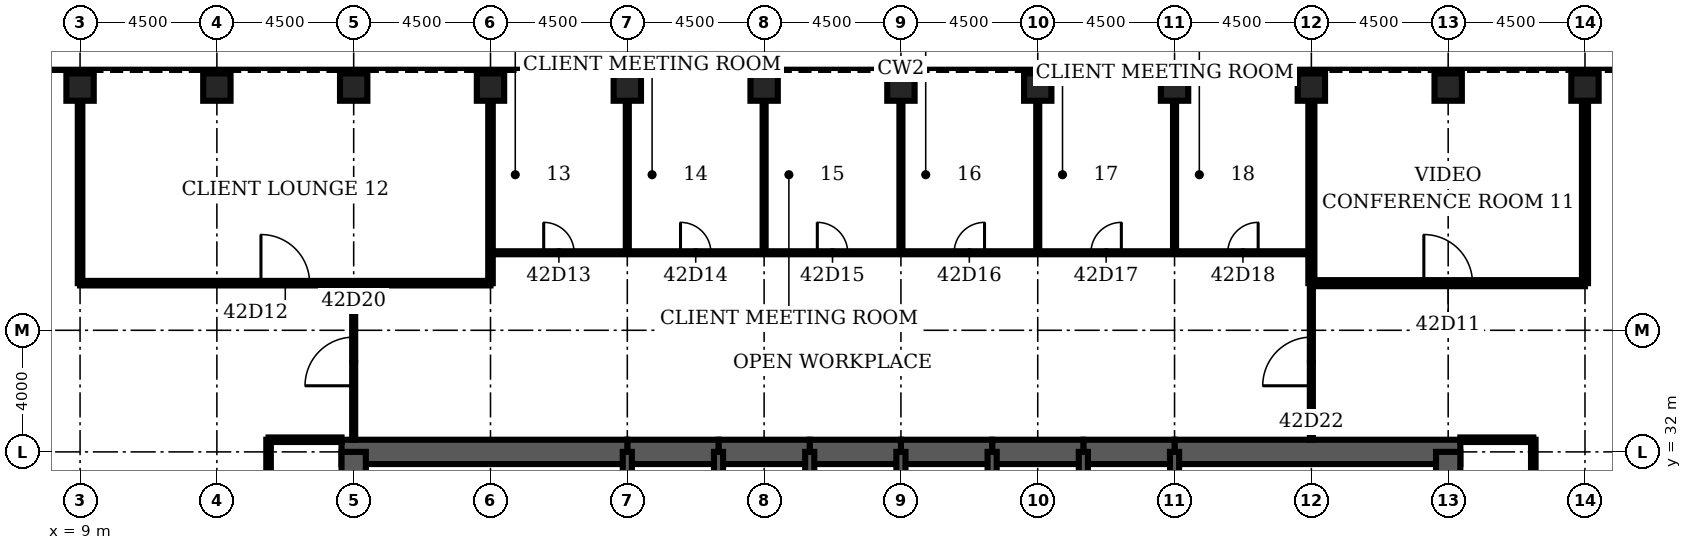
"""IFC4 building model, lengths in metres.
Left out: names, types, materials, properties, quantities, classifications, styles, units other than length and angle.
Written with IfcOpenShell. Run it as: python <this file> out.ifc"""

import sys

from ifc_helpers import new_model, si_unit, direction, frame, frame_2d, origin, origin_2d, place, context, subcontext, project, spatial, rectangle, hollow_rectangle, extrude, element, fill, save


model = new_model("IFC4")
c1 = context("Model", 3, precision=1e-05, world=origin(), true_north=direction((0.0, 1.0)))
c2 = subcontext(c1, "Body", "Model", "MODEL_VIEW")
j1 = project(units=[si_unit("LENGTHUNIT", "METRE"), si_unit("PLANEANGLEUNIT", "RADIAN")], contexts=[c1])
p1 = place(None, origin())
s1 = spatial("IfcSite", under=j1, at=p1, CompositionType="ELEMENT")
p2 = place(p1, origin())
s2 = spatial("IfcBuilding", under=s1, at=p2, CompositionType="ELEMENT")
p3 = place(p2, frame((0.0, 0.0, 190.0)))
s3 = spatial("IfcBuildingStorey", under=s2, at=p3, CompositionType="ELEMENT", Elevation=190.0)
for number, where, z_axis, x_axis in (
    (1, (58.5, 44.0, 0.0), (0.0, 0.0, 1.0), (0.0, 1.0, 0.0)),
    (2, (54.0, 44.0, 0.0), (0.0, 0.0, 1.0), (0.0, 1.0, 0.0)),
    (3, (49.5, 44.0, 0.0), (0.0, 0.0, 1.0), (0.0, 1.0, 0.0)),
    (4, (45.0, 44.0, 0.0), (0.0, 0.0, 1.0), (0.0, 1.0, 0.0)),
    (5, (40.5, 44.0, 0.0), (0.0, 0.0, 1.0), (0.0, 1.0, 0.0)),
    (6, (36.0, 44.0, 0.0), (0.0, 0.0, 1.0), (0.0, 1.0, 0.0)),
    (7, (31.5, 44.0, 0.0), (0.0, 0.0, 1.0), (0.0, 1.0, 0.0)),
    (8, (27.0, 44.0, 0.0), (0.0, 0.0, 1.0), (0.0, 1.0, 0.0)),
    (9, (22.5, 44.0, 0.0), (0.0, 0.0, 1.0), (0.0, 1.0, 0.0)),
    (10, (18.0, 44.0, 0.0), (0.0, 0.0, 1.0), (0.0, 1.0, 0.0)),
    (11, (13.5, 44.0, 0.0), (0.0, 0.0, 1.0), (0.0, 1.0, 0.0)),
    (12, (9.0, 44.0, 0.0), (0.0, 0.0, 1.0), (0.0, 1.0, 0.0)),
):
    element("IfcColumn", number, at=place(p3, frame(where, z_axis=z_axis, x_axis=x_axis)), inside=s3, PredefinedType="COLUMN", context=c2, shape_type="SweptSolid", body=[
        extrude(hollow_rectangle(XDim=0.9, YDim=0.9, WallThickness=0.09, at=origin_2d()), origin(), (0.0, 0.0, 1.0), 4.2),
    ])
p4 = place(p3, frame((54.4, 32.0, 0.0), z_axis=(0.0, 0.0, 1.0), x_axis=(-1.0, 0.0, 0.0)))
e13 = element("IfcWall", 13, at=p4, inside=s3, PredefinedType="SHEAR", context=c2, shape_type="SweptSolid", body=[
    extrude(rectangle(XDim=9.4, YDim=0.8, at=frame_2d((4.7, 0.0))), origin(), (0.0, 0.0, 1.0), 4.2),
])
for number, where, z_axis, x_axis in (
    (14, (45.0, 32.0, 0.0), (0.0, 0.0, 1.0), (-1.0, 0.0, 0.0)),
    (15, (42.0, 32.0, 0.0), (0.0, 0.0, 1.0), (-1.0, 0.0, 0.0)),
    (16, (39.0, 32.0, 0.0), (0.0, 0.0, 1.0), (-1.0, 0.0, 0.0)),
    (17, (36.0, 32.0, 0.0), (0.0, 0.0, 1.0), (-1.0, 0.0, 0.0)),
    (18, (33.0, 32.0, 0.0), (0.0, 0.0, 1.0), (-1.0, 0.0, 0.0)),
    (19, (30.0, 32.0, 0.0), (0.0, 0.0, 1.0), (-1.0, 0.0, 0.0)),
):
    element("IfcWall", number, at=place(p3, frame(where, z_axis=z_axis, x_axis=x_axis)), inside=s3, PredefinedType="SHEAR", context=c2, shape_type="SweptSolid", body=[
        extrude(rectangle(XDim=3.0, YDim=0.8, at=frame_2d((1.5, 0.0))), origin(), (0.0, 0.0, 1.0), 4.2),
    ])
p5 = place(p3, frame((27.0, 32.0, 0.0), z_axis=(0.0, 0.0, 1.0), x_axis=(-1.0, 0.0, 0.0)))
e20 = element("IfcWall", 20, at=p5, inside=s3, PredefinedType="SHEAR", context=c2, shape_type="SweptSolid", body=[
    extrude(rectangle(XDim=9.4, YDim=0.8, at=frame_2d((4.7, 0.0))), origin(), (0.0, 0.0, 1.0), 4.2),
])
for number, where, z_axis, x_axis in (
    (21, (18.0, 32.0, 0.0), (0.0, 0.0, 1.0), (0.0, -1.0, 0.0)),
    (22, (54.0, 28.8, 0.0), (0.0, 0.0, 1.0), (0.0, 1.0, 0.0)),
):
    element("IfcWall", number, at=place(p3, frame(where, z_axis=z_axis, x_axis=x_axis)), inside=s3, PredefinedType="SHEAR", context=c2, shape_type="SweptSolid", body=[
        extrude(rectangle(XDim=3.2, YDim=0.8, at=frame_2d((1.6, 0.0))), origin(), (0.0, 0.0, 1.0), 4.2),
    ])
for number, where, z_axis, x_axis in (
    (23, (27.0, 28.8, 0.0), (0.0, 0.0, 1.0), (0.0, 1.0, 0.0)),
    (24, (30.0, 28.8, 0.0), (0.0, 0.0, 1.0), (0.0, 1.0, 0.0)),
    (25, (33.0, 28.8, 0.0), (0.0, 0.0, 1.0), (0.0, 1.0, 0.0)),
    (26, (36.0, 28.8, 0.0), (0.0, 0.0, 1.0), (0.0, 1.0, 0.0)),
    (27, (39.0, 28.8, 0.0), (0.0, 0.0, 1.0), (0.0, 1.0, 0.0)),
    (28, (42.0, 28.8, 0.0), (0.0, 0.0, 1.0), (0.0, 1.0, 0.0)),
    (29, (45.0, 28.8, 0.0), (0.0, 0.0, 1.0), (0.0, 1.0, 0.0)),
):
    element("IfcWall", number, at=place(p3, frame(where, z_axis=z_axis, x_axis=x_axis)), inside=s3, PredefinedType="SOLIDWALL", context=c2, shape_type="SweptSolid", body=[
        extrude(rectangle(XDim=3.2, YDim=0.3, at=frame_2d((1.6, 0.0))), origin(), (0.0, 0.0, 1.0), 4.2),
    ])
for number, where, z_axis, x_axis in (
    (30, (15.2, 32.4, 0.0), (0.0, 0.0, 1.0), (1.0, 0.0, 0.0)),
    (31, (54.4, 32.4, 0.0), (0.0, 0.0, 1.0), (1.0, 0.0, 0.0)),
):
    element("IfcWall", number, at=place(p3, frame(where, z_axis=z_axis, x_axis=x_axis)), inside=s3, PredefinedType="PARTITIONING", context=c2, shape_type="SweptSolid", body=[
        extrude(rectangle(XDim=2.4, YDim=0.15, at=frame_2d((1.2, 0.0))), origin(), (0.0, 0.0, 1.0), 3.0),
    ])
p6 = place(p3, frame((9.0, 37.55, 0.0), z_axis=(0.0, 0.0, 1.0), x_axis=(1.0, 0.0, 0.0)))
e32 = element("IfcWall", 32, at=p6, inside=s3, PredefinedType="PARTITIONING", context=c2, shape_type="SweptSolid", body=[
    extrude(rectangle(XDim=13.5, YDim=0.15, at=frame_2d((6.75, 0.0))), origin(), (0.0, 0.0, 1.0), 3.0),
])
p7 = place(p6, frame((5.95, 0.0, 0.0)))
e33 = element("IfcOpeningElement", 33, at=p7, cuts=e32, PredefinedType="OPENING", context=c2, shape_type="SweptSolid", body=[
    extrude(rectangle(XDim=1.6, YDim=2.1, at=frame_2d((0.8, 1.05))), frame((0.0, 0.085, 0.0), z_axis=(0.0, -1.0, 0.0), x_axis=(1.0, 0.0, 0.0)), (0.0, 0.0, 1.0), 0.17),
])
p8 = place(p3, frame((49.5, 37.55, 0.0), z_axis=(0.0, 0.0, 1.0), x_axis=(1.0, 0.0, 0.0)))
e34 = element("IfcWall", 34, at=p8, inside=s3, PredefinedType="PARTITIONING", context=c2, shape_type="SweptSolid", body=[
    extrude(rectangle(XDim=9.0, YDim=0.2, at=frame_2d((4.5, 0.0))), origin(), (0.0, 0.0, 1.0), 3.0),
])
p9 = place(p8, frame((3.7, 0.0, 0.0)))
e35 = element("IfcOpeningElement", 35, at=p9, cuts=e34, PredefinedType="OPENING", context=c2, shape_type="SweptSolid", body=[
    extrude(rectangle(XDim=1.6, YDim=2.1, at=frame_2d((0.8, 1.05))), frame((0.0, 0.11, 0.0), z_axis=(0.0, -1.0, 0.0), x_axis=(1.0, 0.0, 0.0)), (0.0, 0.0, 1.0), 0.22),
])
p10 = place(p3, frame((22.5, 38.55, 0.0), z_axis=(0.0, 0.0, 1.0), x_axis=(1.0, 0.0, 0.0)))
e36 = element("IfcWall", 36, at=p10, inside=s3, PredefinedType="PARTITIONING", context=c2, shape_type="SweptSolid", body=[
    extrude(rectangle(XDim=27.0, YDim=0.1, at=frame_2d((13.5, 0.0))), origin(), (0.0, 0.0, 1.0), 3.0),
])
p11 = place(p10, frame((1.75, 0.0, 0.0)))
e37 = element("IfcOpeningElement", 37, at=p11, cuts=e36, PredefinedType="OPENING", context=c2, shape_type="SweptSolid", body=[
    extrude(rectangle(XDim=1.0, YDim=2.1, at=frame_2d((0.5, 1.05))), frame((0.0, 0.06, 0.0), z_axis=(0.0, -1.0, 0.0), x_axis=(1.0, 0.0, 0.0)), (0.0, 0.0, 1.0), 0.12),
])
p12 = place(p10, frame((6.25, 0.0, 0.0)))
e38 = element("IfcOpeningElement", 38, at=p12, cuts=e36, PredefinedType="OPENING", context=c2, shape_type="SweptSolid", body=[
    extrude(rectangle(XDim=1.0, YDim=2.1, at=frame_2d((0.5, 1.05))), frame((0.0, 0.06, 0.0), z_axis=(0.0, -1.0, 0.0), x_axis=(1.0, 0.0, 0.0)), (0.0, 0.0, 1.0), 0.12),
])
p13 = place(p10, frame((10.75, 0.0, 0.0)))
e39 = element("IfcOpeningElement", 39, at=p13, cuts=e36, PredefinedType="OPENING", context=c2, shape_type="SweptSolid", body=[
    extrude(rectangle(XDim=1.0, YDim=2.1, at=frame_2d((0.5, 1.05))), frame((0.0, 0.06, 0.0), z_axis=(0.0, -1.0, 0.0), x_axis=(1.0, 0.0, 0.0)), (0.0, 0.0, 1.0), 0.12),
])
p14 = place(p10, frame((15.25, 0.0, 0.0)))
e40 = element("IfcOpeningElement", 40, at=p14, cuts=e36, PredefinedType="OPENING", context=c2, shape_type="SweptSolid", body=[
    extrude(rectangle(XDim=1.0, YDim=2.1, at=frame_2d((0.5, 1.05))), frame((0.0, 0.06, 0.0), z_axis=(0.0, -1.0, 0.0), x_axis=(1.0, 0.0, 0.0)), (0.0, 0.0, 1.0), 0.12),
])
p15 = place(p10, frame((19.75, 0.0, 0.0)))
e41 = element("IfcOpeningElement", 41, at=p15, cuts=e36, PredefinedType="OPENING", context=c2, shape_type="SweptSolid", body=[
    extrude(rectangle(XDim=1.0, YDim=2.1, at=frame_2d((0.5, 1.05))), frame((0.0, 0.06, 0.0), z_axis=(0.0, -1.0, 0.0), x_axis=(1.0, 0.0, 0.0)), (0.0, 0.0, 1.0), 0.12),
])
p16 = place(p10, frame((24.25, 0.0, 0.0)))
e42 = element("IfcOpeningElement", 42, at=p16, cuts=e36, PredefinedType="OPENING", context=c2, shape_type="SweptSolid", body=[
    extrude(rectangle(XDim=1.0, YDim=2.1, at=frame_2d((0.5, 1.05))), frame((0.0, 0.06, 0.0), z_axis=(0.0, -1.0, 0.0), x_axis=(1.0, 0.0, 0.0)), (0.0, 0.0, 1.0), 0.12),
])
p17 = place(p3, frame((9.0, 37.55, 0.0), z_axis=(0.0, 0.0, 1.0), x_axis=(0.0, 1.0, 0.0)))
e43 = element("IfcWall", 43, at=p17, inside=s3, PredefinedType="PARTITIONING", context=c2, shape_type="SweptSolid", body=[
    extrude(rectangle(XDim=6.0, YDim=0.15, at=frame_2d((3.0, 0.0))), origin(), (0.0, 0.0, 1.0), 3.0),
])
p18 = place(p3, frame((15.2, 13.8, 0.0), z_axis=(0.0, 0.0, 1.0), x_axis=(0.0, 1.0, 0.0)))
e44 = element("IfcWall", 44, at=p18, inside=s3, PredefinedType="PARTITIONING", context=c2, shape_type="SweptSolid", body=[
    extrude(rectangle(XDim=18.6, YDim=0.15, at=frame_2d((9.3, 0.0))), origin(), (0.0, 0.0, 1.0), 3.0),
])
p19 = place(p18, frame((8.7, 0.0, 0.0)))
e45 = element("IfcOpeningElement", 45, at=p19, cuts=e44, PredefinedType="OPENING", context=c2, shape_type="SweptSolid", body=[
    extrude(rectangle(XDim=1.2, YDim=2.1, at=frame_2d((0.6, 1.05))), frame((0.0, 0.085, 0.0), z_axis=(0.0, -1.0, 0.0), x_axis=(1.0, 0.0, 0.0)), (0.0, 0.0, 1.0), 0.17),
])
p20 = place(p3, frame((18.0, 32.4, 0.0), z_axis=(0.0, 0.0, 1.0), x_axis=(0.0, 1.0, 0.0)))
e46 = element("IfcWall", 46, at=p20, inside=s3, PredefinedType="PARTITIONING", context=c2, shape_type="SweptSolid", body=[
    extrude(rectangle(XDim=5.15, YDim=0.1, at=frame_2d((2.575, 0.0))), origin(), (0.0, 0.0, 1.0), 3.0),
])
p21 = place(p20, frame((1.775, 0.0, 0.0)))
e47 = element("IfcOpeningElement", 47, at=p21, cuts=e46, PredefinedType="OPENING", context=c2, shape_type="SweptSolid", body=[
    extrude(rectangle(XDim=1.6, YDim=2.1, at=frame_2d((0.8, 1.05))), frame((0.0, 0.06, 0.0), z_axis=(0.0, -1.0, 0.0), x_axis=(1.0, 0.0, 0.0)), (0.0, 0.0, 1.0), 0.12),
])
p22 = place(p3, frame((22.5, 37.55, 0.0), z_axis=(0.0, 0.0, 1.0), x_axis=(0.0, 1.0, 0.0)))
e48 = element("IfcWall", 48, at=p22, inside=s3, PredefinedType="PARTITIONING", context=c2, shape_type="SweptSolid", body=[
    extrude(rectangle(XDim=6.0, YDim=0.15, at=frame_2d((3.0, 0.0))), origin(), (0.0, 0.0, 1.0), 3.0),
])
for number, where, z_axis, x_axis in (
    (49, (27.0, 38.55, 0.0), (0.0, 0.0, 1.0), (0.0, 1.0, 0.0)),
    (50, (31.5, 38.55, 0.0), (0.0, 0.0, 1.0), (0.0, 1.0, 0.0)),
    (51, (36.0, 38.55, 0.0), (0.0, 0.0, 1.0), (0.0, 1.0, 0.0)),
    (52, (40.5, 38.55, 0.0), (0.0, 0.0, 1.0), (0.0, 1.0, 0.0)),
    (53, (45.0, 38.55, 0.0), (0.0, 0.0, 1.0), (0.0, 1.0, 0.0)),
):
    element("IfcWall", number, at=place(p3, frame(where, z_axis=z_axis, x_axis=x_axis)), inside=s3, PredefinedType="PARTITIONING", context=c2, shape_type="SweptSolid", body=[
        extrude(rectangle(XDim=5.0, YDim=0.1, at=frame_2d((2.5, 0.0))), origin(), (0.0, 0.0, 1.0), 3.0),
    ])
p23 = place(p3, frame((49.5, 32.4, 0.0), z_axis=(0.0, 0.0, 1.0), x_axis=(0.0, 1.0, 0.0)))
e54 = element("IfcWall", 54, at=p23, inside=s3, PredefinedType="PARTITIONING", context=c2, shape_type="SweptSolid", body=[
    extrude(rectangle(XDim=5.15, YDim=0.1, at=frame_2d((2.575, 0.0))), origin(), (0.0, 0.0, 1.0), 3.0),
])
p24 = place(p23, frame((1.775, 0.0, 0.0)))
e55 = element("IfcOpeningElement", 55, at=p24, cuts=e54, PredefinedType="OPENING", context=c2, shape_type="SweptSolid", body=[
    extrude(rectangle(XDim=1.6, YDim=2.1, at=frame_2d((0.8, 1.05))), frame((0.0, 0.06, 0.0), z_axis=(0.0, -1.0, 0.0), x_axis=(1.0, 0.0, 0.0)), (0.0, 0.0, 1.0), 0.12),
])
p25 = place(p3, frame((49.5, 37.55, 0.0), z_axis=(0.0, 0.0, 1.0), x_axis=(0.0, 1.0, 0.0)))
e56 = element("IfcWall", 56, at=p25, inside=s3, PredefinedType="PARTITIONING", context=c2, shape_type="SweptSolid", body=[
    extrude(rectangle(XDim=6.0, YDim=0.2, at=frame_2d((3.0, 0.0))), origin(), (0.0, 0.0, 1.0), 3.0),
])
p26 = place(p3, frame((56.8, 13.8, 0.0), z_axis=(0.0, 0.0, 1.0), x_axis=(0.0, 1.0, 0.0)))
e57 = element("IfcWall", 57, at=p26, inside=s3, PredefinedType="PARTITIONING", context=c2, shape_type="SweptSolid", body=[
    extrude(rectangle(XDim=18.6, YDim=0.15, at=frame_2d((9.3, 0.0))), origin(), (0.0, 0.0, 1.0), 3.0),
])
p27 = place(p26, frame((8.7, 0.0, 0.0)))
e58 = element("IfcOpeningElement", 58, at=p27, cuts=e57, PredefinedType="OPENING", context=c2, shape_type="SweptSolid", body=[
    extrude(rectangle(XDim=1.2, YDim=2.1, at=frame_2d((0.6, 1.05))), frame((0.0, 0.085, 0.0), z_axis=(0.0, -1.0, 0.0), x_axis=(1.0, 0.0, 0.0)), (0.0, 0.0, 1.0), 0.17),
])
p28 = place(p3, frame((58.5, 37.55, 0.0), z_axis=(0.0, 0.0, 1.0), x_axis=(0.0, 1.0, 0.0)))
e59 = element("IfcWall", 59, at=p28, inside=s3, PredefinedType="PARTITIONING", context=c2, shape_type="SweptSolid", body=[
    extrude(rectangle(XDim=6.0, YDim=0.2, at=frame_2d((3.0, 0.0))), origin(), (0.0, 0.0, 1.0), 3.0),
])
p29 = place(p9, origin())
e60 = element("IfcDoor", 60, at=p29, inside=s3, OperationType="SINGLE_SWING_LEFT", PredefinedType="DOOR", context=c2, shape_type="SweptSolid", body=[
    extrude(rectangle(XDim=1.6, YDim=2.1, at=frame_2d((0.8, 1.05))), frame((0.0, 0.025, 0.0), z_axis=(0.0, -1.0, 0.0), x_axis=(1.0, 0.0, 0.0)), (0.0, 0.0, 1.0), 0.05),
])
fill(e35, e60)
p30 = place(p7, origin())
e61 = element("IfcDoor", 61, at=p30, inside=s3, OperationType="SINGLE_SWING_LEFT", PredefinedType="DOOR", context=c2, shape_type="SweptSolid", body=[
    extrude(rectangle(XDim=1.6, YDim=2.1, at=frame_2d((0.8, 1.05))), frame((0.0, 0.025, 0.0), z_axis=(0.0, -1.0, 0.0), x_axis=(1.0, 0.0, 0.0)), (0.0, 0.0, 1.0), 0.05),
])
fill(e33, e61)
p31 = place(p11, origin())
e62 = element("IfcDoor", 62, at=p31, inside=s3, OperationType="SINGLE_SWING_LEFT", PredefinedType="DOOR", context=c2, shape_type="SweptSolid", body=[
    extrude(rectangle(XDim=1.0, YDim=2.1, at=frame_2d((0.5, 1.05))), frame((0.0, 0.025, 0.0), z_axis=(0.0, -1.0, 0.0), x_axis=(1.0, 0.0, 0.0)), (0.0, 0.0, 1.0), 0.05),
])
fill(e37, e62)
p32 = place(p12, origin())
e63 = element("IfcDoor", 63, at=p32, inside=s3, OperationType="SINGLE_SWING_LEFT", PredefinedType="DOOR", context=c2, shape_type="SweptSolid", body=[
    extrude(rectangle(XDim=1.0, YDim=2.1, at=frame_2d((0.5, 1.05))), frame((0.0, 0.025, 0.0), z_axis=(0.0, -1.0, 0.0), x_axis=(1.0, 0.0, 0.0)), (0.0, 0.0, 1.0), 0.05),
])
fill(e38, e63)
p33 = place(p13, origin())
e64 = element("IfcDoor", 64, at=p33, inside=s3, OperationType="SINGLE_SWING_LEFT", PredefinedType="DOOR", context=c2, shape_type="SweptSolid", body=[
    extrude(rectangle(XDim=1.0, YDim=2.1, at=frame_2d((0.5, 1.05))), frame((0.0, 0.025, 0.0), z_axis=(0.0, -1.0, 0.0), x_axis=(1.0, 0.0, 0.0)), (0.0, 0.0, 1.0), 0.05),
])
fill(e39, e64)
p34 = place(p14, origin())
e65 = element("IfcDoor", 65, at=p34, inside=s3, OperationType="SINGLE_SWING_RIGHT", PredefinedType="DOOR", context=c2, shape_type="SweptSolid", body=[
    extrude(rectangle(XDim=1.0, YDim=2.1, at=frame_2d((0.5, 1.05))), frame((0.0, 0.025, 0.0), z_axis=(0.0, -1.0, 0.0), x_axis=(1.0, 0.0, 0.0)), (0.0, 0.0, 1.0), 0.05),
])
fill(e40, e65)
p35 = place(p15, origin())
e66 = element("IfcDoor", 66, at=p35, inside=s3, OperationType="SINGLE_SWING_RIGHT", PredefinedType="DOOR", context=c2, shape_type="SweptSolid", body=[
    extrude(rectangle(XDim=1.0, YDim=2.1, at=frame_2d((0.5, 1.05))), frame((0.0, 0.025, 0.0), z_axis=(0.0, -1.0, 0.0), x_axis=(1.0, 0.0, 0.0)), (0.0, 0.0, 1.0), 0.05),
])
fill(e41, e66)
p36 = place(p16, origin())
e67 = element("IfcDoor", 67, at=p36, inside=s3, OperationType="SINGLE_SWING_RIGHT", PredefinedType="DOOR", context=c2, shape_type="SweptSolid", body=[
    extrude(rectangle(XDim=1.0, YDim=2.1, at=frame_2d((0.5, 1.05))), frame((0.0, 0.025, 0.0), z_axis=(0.0, -1.0, 0.0), x_axis=(1.0, 0.0, 0.0)), (0.0, 0.0, 1.0), 0.05),
])
fill(e42, e67)
p37 = place(p21, origin())
e68 = element("IfcDoor", 68, at=p37, inside=s3, OperationType="SINGLE_SWING_LEFT", PredefinedType="DOOR", context=c2, shape_type="SweptSolid", body=[
    extrude(rectangle(XDim=1.6, YDim=2.1, at=frame_2d((0.8, 1.05))), frame((0.0, 0.025, 0.0), z_axis=(0.0, -1.0, 0.0), x_axis=(1.0, 0.0, 0.0)), (0.0, 0.0, 1.0), 0.05),
])
fill(e47, e68)
p38 = place(p24, origin())
e69 = element("IfcDoor", 69, at=p38, inside=s3, OperationType="SINGLE_SWING_LEFT", PredefinedType="DOOR", context=c2, shape_type="SweptSolid", body=[
    extrude(rectangle(XDim=1.6, YDim=2.1, at=frame_2d((0.8, 1.05))), frame((0.0, 0.025, 0.0), z_axis=(0.0, -1.0, 0.0), x_axis=(1.0, 0.0, 0.0)), (0.0, 0.0, 1.0), 0.05),
])
fill(e55, e69)
save(model, sys.argv[1])
